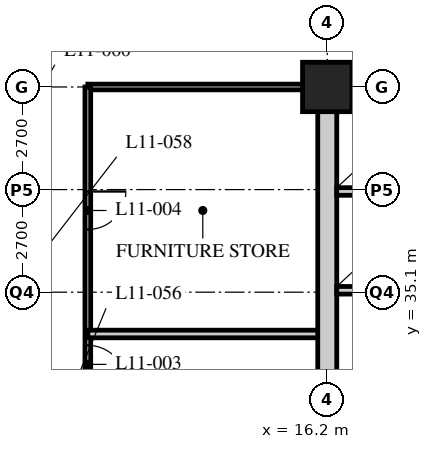
"""IFC4 building model, lengths in metres.
Left out: names, types, materials, properties, quantities, classifications, styles, units other than length and angle.
Written with IfcOpenShell. Run it as: python <this file> out.ifc"""

import sys

from ifc_helpers import new_model, si_unit, direction, frame, frame_2d, origin, origin_2d, place, context, subcontext, project, spatial, rectangle, hollow_rectangle, extrude, element, fill, save


model = new_model("IFC4")
c1 = context("Model", 3, precision=1e-05, world=origin(), true_north=direction((0.0, 1.0)))
c2 = subcontext(c1, "Body", "Model", "MODEL_VIEW")
j1 = project(units=[si_unit("LENGTHUNIT", "METRE"), si_unit("PLANEANGLEUNIT", "RADIAN")], contexts=[c1])
p1 = place(None, origin())
s1 = spatial("IfcSite", under=j1, at=p1, CompositionType="ELEMENT")
p2 = place(p1, origin())
s2 = spatial("IfcBuilding", under=s1, at=p2, CompositionType="ELEMENT")
p3 = place(p2, frame((0.0, 0.0, 50.0)))
s3 = spatial("IfcBuildingStorey", under=s2, at=p3, CompositionType="ELEMENT", Elevation=50.0)
p4 = place(p3, frame((16.2, 40.5, 0.0), z_axis=(0.0, 0.0, 1.0), x_axis=(1.0, 0.0, 0.0)))
e1 = element("IfcColumn", 1, at=p4, inside=s3, PredefinedType="COLUMN", context=c2, shape_type="SweptSolid", body=[
    extrude(hollow_rectangle(XDim=1.3, YDim=1.3, WallThickness=0.13, at=origin_2d()), origin(), (0.0, 0.0, 1.0), 3.4),
])
p5 = place(p3, frame((16.0, 40.5, 0.0), z_axis=(0.0, 0.0, 1.0), x_axis=(-1.0, 0.0, 0.0)))
e2 = element("IfcWall", 2, at=p5, inside=s3, PredefinedType="PARTITIONING", context=c2, shape_type="SweptSolid", body=[
    extrude(rectangle(XDim=6.1, YDim=0.15, at=frame_2d((3.05, 0.0))), origin(), (0.0, 0.0, 1.0), 2.578),
])
p6 = place(p3, frame((9.9, 40.5, 0.0), z_axis=(0.0, 0.0, 1.0), x_axis=(0.0, -1.0, 0.0)))
e3 = element("IfcWall", 3, at=p6, inside=s3, PredefinedType="PARTITIONING", context=c2, shape_type="SweptSolid", body=[
    extrude(rectangle(XDim=22.5, YDim=0.15, at=frame_2d((11.25, 0.0))), origin(), (0.0, 0.0, 1.0), 3.19),
])
p7 = place(p6, frame((14.271, 0.0, 0.0)))
e4 = element("IfcOpeningElement", 4, at=p7, cuts=e3, PredefinedType="OPENING", context=c2, shape_type="SweptSolid", body=[
    extrude(rectangle(XDim=1.0, YDim=2.1, at=frame_2d((0.5, 1.05))), frame((0.0, 0.085, 0.0), z_axis=(0.0, -1.0, 0.0), x_axis=(1.0, 0.0, 0.0)), (0.0, 0.0, 1.0), 0.17),
])
p8 = place(p6, frame((10.221, 0.0, 0.0)))
e5 = element("IfcOpeningElement", 5, at=p8, cuts=e3, PredefinedType="OPENING", context=c2, shape_type="SweptSolid", body=[
    extrude(rectangle(XDim=1.0, YDim=2.1, at=frame_2d((0.5, 1.05))), frame((0.0, 0.085, 0.0), z_axis=(0.0, -1.0, 0.0), x_axis=(1.0, 0.0, 0.0)), (0.0, 0.0, 1.0), 0.17),
])
p9 = place(p6, frame((6.8, 0.0, 0.0)))
e6 = element("IfcOpeningElement", 6, at=p9, cuts=e3, PredefinedType="OPENING", context=c2, shape_type="SweptSolid", body=[
    extrude(rectangle(XDim=1.0, YDim=2.1, at=frame_2d((0.5, 1.05))), frame((0.0, 0.085, 0.0), z_axis=(0.0, -1.0, 0.0), x_axis=(1.0, 0.0, 0.0)), (0.0, 0.0, 1.0), 0.17),
])
p10 = place(p6, frame((2.75, 0.0, 0.0)))
e7 = element("IfcOpeningElement", 7, at=p10, cuts=e3, PredefinedType="OPENING", context=c2, shape_type="SweptSolid", body=[
    extrude(rectangle(XDim=1.0, YDim=2.1, at=frame_2d((0.5, 1.05))), frame((0.0, 0.085, 0.0), z_axis=(0.0, -1.0, 0.0), x_axis=(1.0, 0.0, 0.0)), (0.0, 0.0, 1.0), 0.17),
])
p11 = place(p3, frame((9.9, 34.0, 0.0), z_axis=(0.0, 0.0, 1.0), x_axis=(1.0, 0.0, 0.0)))
e8 = element("IfcWall", 8, at=p11, inside=s3, PredefinedType="SOLIDWALL", context=c2, shape_type="SweptSolid", body=[
    extrude(rectangle(XDim=6.3, YDim=0.2, at=frame_2d((3.15, 0.0))), origin(), (0.0, 0.0, 1.0), 3.19),
])
p12 = place(p3, frame((15.95, 40.5, 0.0), z_axis=(0.0, 0.0, 1.0), x_axis=(1.0, 0.0, 0.0)))
e9 = element("IfcWall", 9, at=p12, inside=s3, PredefinedType="SOLIDWALL", context=c2, shape_type="SweptSolid", body=[
    extrude(rectangle(XDim=24.8, YDim=0.5, at=frame_2d((12.4, 0.0))), origin(), (0.0, 0.0, 1.0), 2.54),
])
p13 = place(p12, frame((11.5, 0.0, 0.0)))
e10 = element("IfcOpeningElement", 10, at=p13, cuts=e9, PredefinedType="OPENING", context=c2, shape_type="SweptSolid", body=[
    extrude(rectangle(XDim=1.8, YDim=2.4, at=frame_2d((0.9, 1.2))), frame((0.0, 0.26, 0.0), z_axis=(0.0, -1.0, 0.0), x_axis=(1.0, 0.0, 0.0)), (0.0, 0.0, 1.0), 0.52),
])
p14 = place(p3, frame((16.2, 24.55, 0.0), z_axis=(0.0, 0.0, 1.0), x_axis=(0.0, 1.0, 0.0)))
e11 = element("IfcWall", 11, at=p14, inside=s3, PredefinedType="SOLIDWALL", context=c2, shape_type="SweptSolid", body=[
    extrude(rectangle(XDim=15.7, YDim=0.5, at=frame_2d((7.85, 0.0))), origin(), (0.0, 0.0, 1.0), 2.578),
])
for number, where, z_axis, x_axis in (
    (12, (16.45, 35.15, 0.0), (0.0, 0.0, 1.0), (1.0, 0.0, 0.0)),
    (13, (16.45, 37.75, 0.0), (0.0, 0.0, 1.0), (1.0, 0.0, 0.0)),
):
    element("IfcWall", number, at=place(p3, frame(where, z_axis=z_axis, x_axis=x_axis)), inside=s3, PredefinedType="SOLIDWALL", context=c2, shape_type="SweptSolid", body=[
        extrude(rectangle(XDim=2.6, YDim=0.2, at=frame_2d((1.3, 0.0))), origin(), (0.0, 0.0, 1.0), 3.19),
    ])
p15 = place(p9, origin())
e14 = element("IfcDoor", 14, at=p15, inside=s3, OperationType="SINGLE_SWING_RIGHT", PredefinedType="DOOR", context=c2, shape_type="SweptSolid", body=[
    extrude(rectangle(XDim=1.0, YDim=2.1, at=frame_2d((0.5, 1.05))), frame((0.0, 0.025, 0.0), z_axis=(0.0, -1.0, 0.0), x_axis=(1.0, 0.0, 0.0)), (0.0, 0.0, 1.0), 0.05),
])
fill(e6, e14)
p16 = place(p10, origin())
e15 = element("IfcDoor", 15, at=p16, inside=s3, OperationType="SINGLE_SWING_LEFT", PredefinedType="DOOR", context=c2, shape_type="SweptSolid", body=[
    extrude(rectangle(XDim=1.0, YDim=2.1, at=frame_2d((0.5, 1.05))), frame((0.0, 0.025, 0.0), z_axis=(0.0, -1.0, 0.0), x_axis=(1.0, 0.0, 0.0)), (0.0, 0.0, 1.0), 0.05),
])
fill(e7, e15)
save(model, sys.argv[1])
